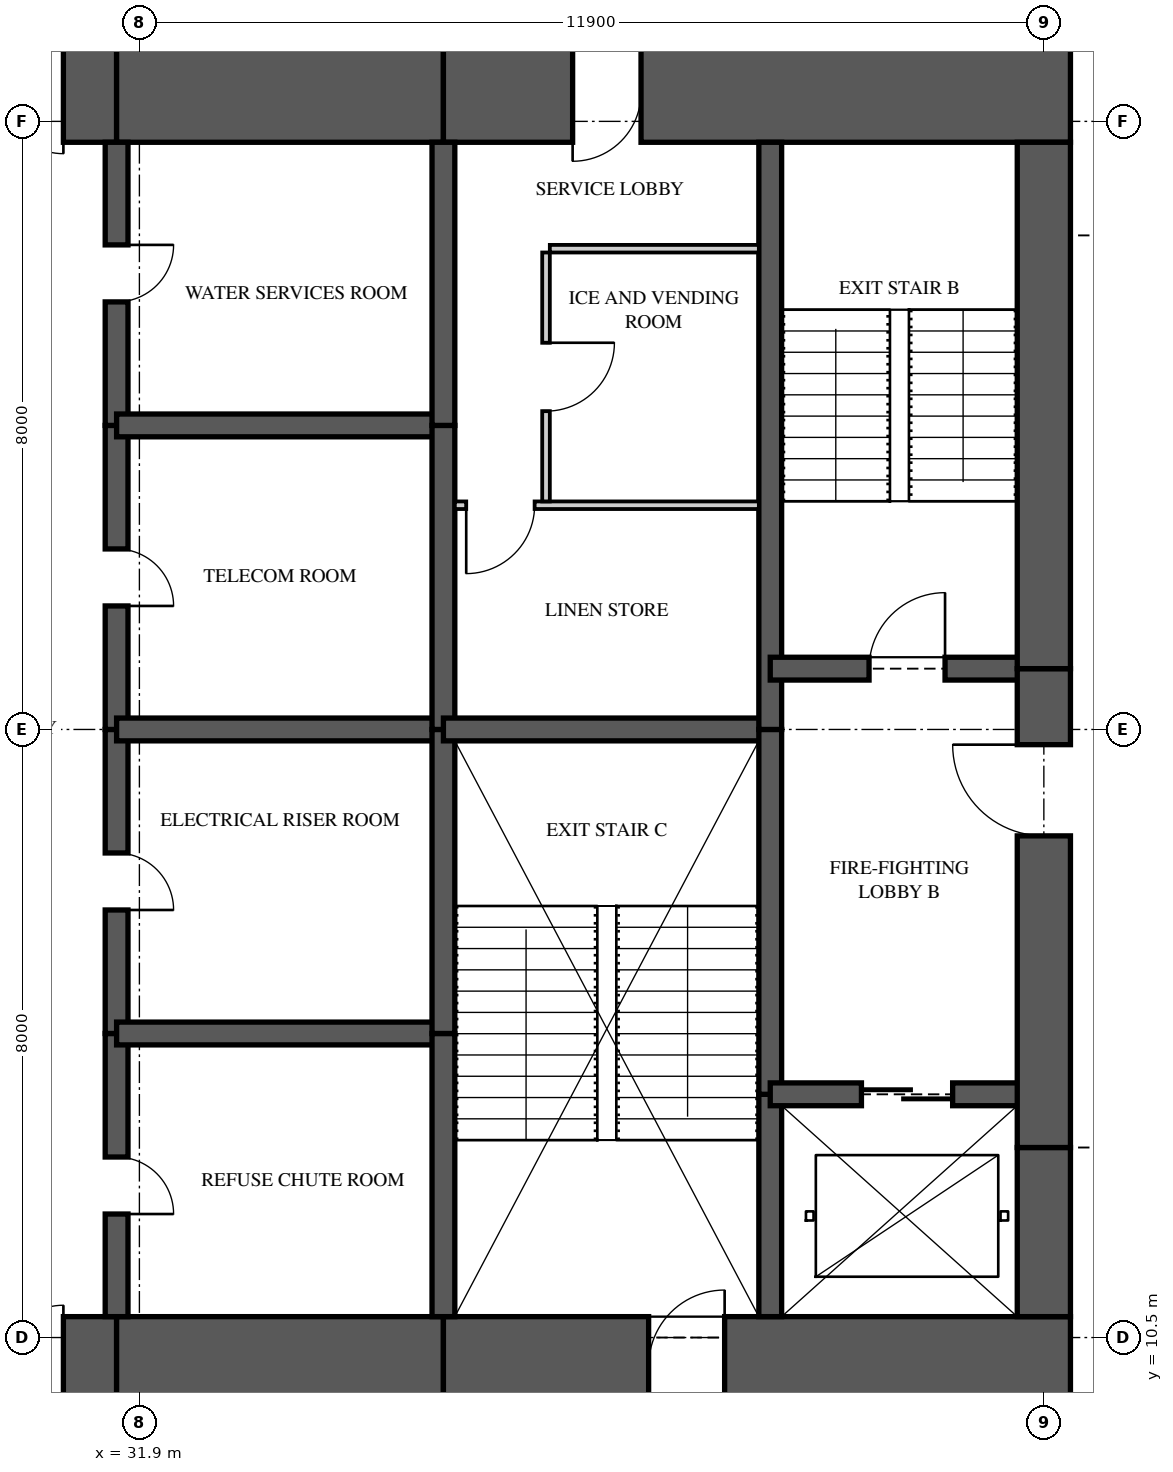
"""IFC4 building model, lengths in metres.
Left out: names, types, materials, properties, quantities, classifications, styles, units other than length and angle.
Written with IfcOpenShell. Run it as: python <this file> out.ifc"""

import sys

from ifc_helpers import new_model, si_unit, direction, frame, frame_2d, origin, place, context, subcontext, project, spatial, rectangle, extrude, element, fill, save


model = new_model("IFC4")
c1 = context("Model", 3, precision=1e-05, world=origin(), true_north=direction((0.0, 1.0)))
c2 = subcontext(c1, "Body", "Model", "MODEL_VIEW")
j1 = project(units=[si_unit("LENGTHUNIT", "METRE"), si_unit("PLANEANGLEUNIT", "RADIAN")], contexts=[c1])
p1 = place(None, origin())
s1 = spatial("IfcSite", under=j1, at=p1, CompositionType="ELEMENT")
p2 = place(p1, origin())
s2 = spatial("IfcBuilding", under=s1, at=p2, CompositionType="ELEMENT")
p3 = place(p2, frame((0.0, 0.0, 201.25)))
s3 = spatial("IfcBuildingStorey", under=s2, at=p3, CompositionType="ELEMENT", Elevation=201.25)
p4 = place(p3, frame((26.0, 10.125, 0.0), z_axis=(0.0, 0.0, 1.0), x_axis=(1.0, 0.0, 0.0)))
e1 = element("IfcWall", 1, at=p4, inside=s3, PredefinedType="SHEAR", context=c2, shape_type="SweptSolid", body=[
    extrude(rectangle(XDim=5.6, YDim=1.3, at=frame_2d((2.8, 0.0))), origin(), (0.0, 0.0, 1.0), 3.35),
])
p5 = place(p4, frame((3.3, 0.0, 0.0)))
e2 = element("IfcOpeningElement", 2, at=p5, cuts=e1, PredefinedType="OPENING", context=c2, shape_type="SweptSolid", body=[
    extrude(rectangle(XDim=1.6, YDim=2.1, at=frame_2d((0.8, 1.05))), frame((0.0, 0.66, 0.0), z_axis=(0.0, -1.0, 0.0), x_axis=(1.0, 0.0, 0.0)), (0.0, 0.0, 1.0), 1.32),
])
p6 = place(p3, frame((31.6, 10.125, 0.0), z_axis=(0.0, 0.0, 1.0), x_axis=(1.0, 0.0, 0.0)))
e3 = element("IfcWall", 3, at=p6, inside=s3, PredefinedType="SHEAR", context=c2, shape_type="SweptSolid", body=[
    extrude(rectangle(XDim=4.3, YDim=1.3, at=frame_2d((2.15, 0.0))), origin(), (0.0, 0.0, 1.0), 3.35),
])
p7 = place(p3, frame((35.9, 10.125, 0.0), z_axis=(0.0, 0.0, 1.0), x_axis=(1.0, 0.0, 0.0)))
e4 = element("IfcWall", 4, at=p7, inside=s3, PredefinedType="SHEAR", context=c2, shape_type="SweptSolid", body=[
    extrude(rectangle(XDim=8.25, YDim=1.3, at=frame_2d((4.125, 0.0))), origin(), (0.0, 0.0, 1.0), 3.35),
])
p8 = place(p7, frame((2.7, 0.0, 0.0)))
e5 = element("IfcOpeningElement", 5, at=p8, cuts=e4, PredefinedType="OPENING", context=c2, shape_type="SweptSolid", body=[
    extrude(rectangle(XDim=1.0, YDim=2.1, at=frame_2d((0.5, 1.05))), frame((0.0, 0.66, 0.0), z_axis=(0.0, -1.0, 0.0), x_axis=(1.0, 0.0, 0.0)), (0.0, 0.0, 1.0), 1.32),
])
p9 = place(p3, frame((44.15, 26.875, 0.0), z_axis=(0.0, 0.0, 1.0), x_axis=(-1.0, 0.0, 0.0)))
e6 = element("IfcWall", 6, at=p9, inside=s3, PredefinedType="SHEAR", context=c2, shape_type="SweptSolid", body=[
    extrude(rectangle(XDim=8.25, YDim=1.3, at=frame_2d((4.125, 0.0))), origin(), (0.0, 0.0, 1.0), 3.35),
])
p10 = place(p9, frame((5.65, 0.0, 0.0)))
e7 = element("IfcOpeningElement", 7, at=p10, cuts=e6, PredefinedType="OPENING", context=c2, shape_type="SweptSolid", body=[
    extrude(rectangle(XDim=0.9, YDim=2.1, at=frame_2d((0.45, 1.05))), frame((0.0, 0.66, 0.0), z_axis=(0.0, -1.0, 0.0), x_axis=(1.0, 0.0, 0.0)), (0.0, 0.0, 1.0), 1.32),
])
p11 = place(p3, frame((35.9, 26.875, 0.0), z_axis=(0.0, 0.0, 1.0), x_axis=(-1.0, 0.0, 0.0)))
e8 = element("IfcWall", 8, at=p11, inside=s3, PredefinedType="SHEAR", context=c2, shape_type="SweptSolid", body=[
    extrude(rectangle(XDim=4.3, YDim=1.3, at=frame_2d((2.15, 0.0))), origin(), (0.0, 0.0, 1.0), 3.35),
])
p12 = place(p3, frame((31.6, 26.875, 0.0), z_axis=(0.0, 0.0, 1.0), x_axis=(-1.0, 0.0, 0.0)))
e9 = element("IfcWall", 9, at=p12, inside=s3, PredefinedType="SHEAR", context=c2, shape_type="SweptSolid", body=[
    extrude(rectangle(XDim=5.6, YDim=1.3, at=frame_2d((2.8, 0.0))), origin(), (0.0, 0.0, 1.0), 3.35),
])
p13 = place(p12, frame((0.7, 0.0, 0.0)))
e10 = element("IfcOpeningElement", 10, at=p13, cuts=e9, PredefinedType="OPENING", context=c2, shape_type="SweptSolid", body=[
    extrude(rectangle(XDim=1.6, YDim=2.1, at=frame_2d((0.8, 1.05))), frame((0.0, 0.66, 0.0), z_axis=(0.0, -1.0, 0.0), x_axis=(1.0, 0.0, 0.0)), (0.0, 0.0, 1.0), 1.32),
])
p14 = place(p3, frame((43.8, 10.775, 0.0), z_axis=(0.0, 0.0, 1.0), x_axis=(0.0, 1.0, 0.0)))
e11 = element("IfcWall", 11, at=p14, inside=s3, PredefinedType="SHEAR", context=c2, shape_type="SweptSolid", body=[
    extrude(rectangle(XDim=2.225, YDim=0.7, at=frame_2d((1.113, 0.0))), origin(), (0.0, 0.0, 1.0), 3.35),
])
p15 = place(p3, frame((43.8, 13.0, 0.0), z_axis=(0.0, 0.0, 1.0), x_axis=(0.0, 1.0, 0.0)))
e12 = element("IfcWall", 12, at=p15, inside=s3, PredefinedType="SHEAR", context=c2, shape_type="SweptSolid", body=[
    extrude(rectangle(XDim=6.3, YDim=0.7, at=frame_2d((3.15, 0.0))), origin(), (0.0, 0.0, 1.0), 3.35),
])
p16 = place(p15, frame((4.1, 0.0, 0.0)))
e13 = element("IfcOpeningElement", 13, at=p16, cuts=e12, PredefinedType="OPENING", context=c2, shape_type="SweptSolid", body=[
    extrude(rectangle(XDim=1.2, YDim=2.2, at=frame_2d((0.6, 1.1))), frame((0.0, 0.36, 0.0), z_axis=(0.0, -1.0, 0.0), x_axis=(1.0, 0.0, 0.0)), (0.0, 0.0, 1.0), 0.72),
])
p17 = place(p3, frame((43.8, 19.3, 0.0), z_axis=(0.0, 0.0, 1.0), x_axis=(0.0, 1.0, 0.0)))
e14 = element("IfcWall", 14, at=p17, inside=s3, PredefinedType="SHEAR", context=c2, shape_type="SweptSolid", body=[
    extrude(rectangle(XDim=6.925, YDim=0.7, at=frame_2d((3.462, 0.0))), origin(), (0.0, 0.0, 1.0), 3.35),
])
p18 = place(p3, frame((31.6, 10.775, 0.0), z_axis=(0.0, 0.0, 1.0), x_axis=(0.0, 1.0, 0.0)))
e15 = element("IfcWall", 15, at=p18, inside=s3, PredefinedType="SHEAR", context=c2, shape_type="SweptSolid", body=[
    extrude(rectangle(XDim=3.725, YDim=0.3, at=frame_2d((1.863, 0.0))), origin(), (0.0, 0.0, 1.0), 3.35),
])
p19 = place(p18, frame((1.35, 0.0, 0.0)))
e16 = element("IfcOpeningElement", 16, at=p19, cuts=e15, PredefinedType="OPENING", context=c2, shape_type="SweptSolid", body=[
    extrude(rectangle(XDim=0.75, YDim=2.1, at=frame_2d((0.375, 1.05))), frame((0.0, 0.16, 0.0), z_axis=(0.0, -1.0, 0.0), x_axis=(1.0, 0.0, 0.0)), (0.0, 0.0, 1.0), 0.32),
])
p20 = place(p3, frame((31.6, 14.5, 0.0), z_axis=(0.0, 0.0, 1.0), x_axis=(0.0, 1.0, 0.0)))
e17 = element("IfcWall", 17, at=p20, inside=s3, PredefinedType="SHEAR", context=c2, shape_type="SweptSolid", body=[
    extrude(rectangle(XDim=4.0, YDim=0.3, at=frame_2d((2.0, 0.0))), origin(), (0.0, 0.0, 1.0), 3.35),
])
p21 = place(p20, frame((1.625, 0.0, 0.0)))
e18 = element("IfcOpeningElement", 18, at=p21, cuts=e17, PredefinedType="OPENING", context=c2, shape_type="SweptSolid", body=[
    extrude(rectangle(XDim=0.75, YDim=2.1, at=frame_2d((0.375, 1.05))), frame((0.0, 0.16, 0.0), z_axis=(0.0, -1.0, 0.0), x_axis=(1.0, 0.0, 0.0)), (0.0, 0.0, 1.0), 0.32),
])
p22 = place(p3, frame((31.6, 18.5, 0.0), z_axis=(0.0, 0.0, 1.0), x_axis=(0.0, 1.0, 0.0)))
e19 = element("IfcWall", 19, at=p22, inside=s3, PredefinedType="SHEAR", context=c2, shape_type="SweptSolid", body=[
    extrude(rectangle(XDim=4.0, YDim=0.3, at=frame_2d((2.0, 0.0))), origin(), (0.0, 0.0, 1.0), 3.35),
])
p23 = place(p22, frame((1.625, 0.0, 0.0)))
e20 = element("IfcOpeningElement", 20, at=p23, cuts=e19, PredefinedType="OPENING", context=c2, shape_type="SweptSolid", body=[
    extrude(rectangle(XDim=0.75, YDim=2.1, at=frame_2d((0.375, 1.05))), frame((0.0, 0.16, 0.0), z_axis=(0.0, -1.0, 0.0), x_axis=(1.0, 0.0, 0.0)), (0.0, 0.0, 1.0), 0.32),
])
p24 = place(p3, frame((31.6, 22.5, 0.0), z_axis=(0.0, 0.0, 1.0), x_axis=(0.0, 1.0, 0.0)))
e21 = element("IfcWall", 21, at=p24, inside=s3, PredefinedType="SHEAR", context=c2, shape_type="SweptSolid", body=[
    extrude(rectangle(XDim=3.725, YDim=0.3, at=frame_2d((1.863, 0.0))), origin(), (0.0, 0.0, 1.0), 3.35),
])
p25 = place(p24, frame((1.625, 0.0, 0.0)))
e22 = element("IfcOpeningElement", 22, at=p25, cuts=e21, PredefinedType="OPENING", context=c2, shape_type="SweptSolid", body=[
    extrude(rectangle(XDim=0.75, YDim=2.1, at=frame_2d((0.375, 1.05))), frame((0.0, 0.16, 0.0), z_axis=(0.0, -1.0, 0.0), x_axis=(1.0, 0.0, 0.0)), (0.0, 0.0, 1.0), 0.32),
])
p26 = place(p3, frame((35.9, 10.775, 0.0), z_axis=(0.0, 0.0, 1.0), x_axis=(0.0, 1.0, 0.0)))
e23 = element("IfcWall", 23, at=p26, inside=s3, PredefinedType="SHEAR", context=c2, shape_type="SweptSolid", body=[
    extrude(rectangle(XDim=3.725, YDim=0.3, at=frame_2d((1.863, 0.0))), origin(), (0.0, 0.0, 1.0), 3.35),
])
for number, where, z_axis, x_axis in (
    (24, (35.9, 14.5, 0.0), (0.0, 0.0, 1.0), (0.0, 1.0, 0.0)),
    (25, (35.9, 18.5, 0.0), (0.0, 0.0, 1.0), (0.0, 1.0, 0.0)),
):
    element("IfcWall", number, at=place(p3, frame(where, z_axis=z_axis, x_axis=x_axis)), inside=s3, PredefinedType="SHEAR", context=c2, shape_type="SweptSolid", body=[
        extrude(rectangle(XDim=4.0, YDim=0.3, at=frame_2d((2.0, 0.0))), origin(), (0.0, 0.0, 1.0), 3.35),
    ])
p27 = place(p3, frame((35.9, 22.5, 0.0), z_axis=(0.0, 0.0, 1.0), x_axis=(0.0, 1.0, 0.0)))
e26 = element("IfcWall", 26, at=p27, inside=s3, PredefinedType="SHEAR", context=c2, shape_type="SweptSolid", body=[
    extrude(rectangle(XDim=3.725, YDim=0.3, at=frame_2d((1.863, 0.0))), origin(), (0.0, 0.0, 1.0), 3.35),
])
p28 = place(p3, frame((40.2, 10.775, 0.0), z_axis=(0.0, 0.0, 1.0), x_axis=(0.0, 1.0, 0.0)))
e27 = element("IfcWall", 27, at=p28, inside=s3, PredefinedType="SHEAR", context=c2, shape_type="SweptSolid", body=[
    extrude(rectangle(XDim=2.925, YDim=0.3, at=frame_2d((1.462, 0.0))), origin(), (0.0, 0.0, 1.0), 3.35),
])
p29 = place(p3, frame((40.2, 13.7, 0.0), z_axis=(0.0, 0.0, 1.0), x_axis=(0.0, 1.0, 0.0)))
e28 = element("IfcWall", 28, at=p29, inside=s3, PredefinedType="SHEAR", context=c2, shape_type="SweptSolid", body=[
    extrude(rectangle(XDim=4.8, YDim=0.3, at=frame_2d((2.4, 0.0))), origin(), (0.0, 0.0, 1.0), 3.35),
])
p30 = place(p3, frame((40.2, 18.5, 0.0), z_axis=(0.0, 0.0, 1.0), x_axis=(0.0, 1.0, 0.0)))
e29 = element("IfcWall", 29, at=p30, inside=s3, PredefinedType="SHEAR", context=c2, shape_type="SweptSolid", body=[
    extrude(rectangle(XDim=7.725, YDim=0.3, at=frame_2d((3.863, 0.0))), origin(), (0.0, 0.0, 1.0), 3.35),
])
for number, where, z_axis, x_axis in (
    (30, (31.6, 14.5, 0.0), (0.0, 0.0, 1.0), (1.0, 0.0, 0.0)),
    (31, (31.6, 18.5, 0.0), (0.0, 0.0, 1.0), (1.0, 0.0, 0.0)),
    (32, (31.6, 22.5, 0.0), (0.0, 0.0, 1.0), (1.0, 0.0, 0.0)),
):
    element("IfcWall", number, at=place(p3, frame(where, z_axis=z_axis, x_axis=x_axis)), inside=s3, PredefinedType="SHEAR", context=c2, shape_type="SweptSolid", body=[
        extrude(rectangle(XDim=4.3, YDim=0.3, at=frame_2d((2.15, 0.0))), origin(), (0.0, 0.0, 1.0), 3.35),
    ])
p31 = place(p3, frame((35.9, 18.5, 0.0), z_axis=(0.0, 0.0, 1.0), x_axis=(1.0, 0.0, 0.0)))
e33 = element("IfcWall", 33, at=p31, inside=s3, PredefinedType="SHEAR", context=c2, shape_type="SweptSolid", body=[
    extrude(rectangle(XDim=4.3, YDim=0.3, at=frame_2d((2.15, 0.0))), origin(), (0.0, 0.0, 1.0), 3.35),
])
p32 = place(p3, frame((40.2, 13.7, 0.0), z_axis=(0.0, 0.0, 1.0), x_axis=(1.0, 0.0, 0.0)))
e34 = element("IfcWall", 34, at=p32, inside=s3, PredefinedType="SHEAR", context=c2, shape_type="SweptSolid", body=[
    extrude(rectangle(XDim=3.6, YDim=0.3, at=frame_2d((1.8, 0.0))), origin(), (0.0, 0.0, 1.0), 3.35),
])
p33 = place(p32, frame((1.2, 0.0, 0.0)))
e35 = element("IfcOpeningElement", 35, at=p33, cuts=e34, PredefinedType="OPENING", context=c2, shape_type="SweptSolid", body=[
    extrude(rectangle(XDim=1.2, YDim=2.1, at=frame_2d((0.6, 1.05))), frame((0.0, 0.16, 0.0), z_axis=(0.0, -1.0, 0.0), x_axis=(1.0, 0.0, 0.0)), (0.0, 0.0, 1.0), 0.32),
])
p34 = place(p3, frame((40.2, 19.3, 0.0), z_axis=(0.0, 0.0, 1.0), x_axis=(1.0, 0.0, 0.0)))
e36 = element("IfcWall", 36, at=p34, inside=s3, PredefinedType="SHEAR", context=c2, shape_type="SweptSolid", body=[
    extrude(rectangle(XDim=3.6, YDim=0.3, at=frame_2d((1.8, 0.0))), origin(), (0.0, 0.0, 1.0), 3.35),
])
p35 = place(p34, frame((1.3, 0.0, 0.0)))
e37 = element("IfcOpeningElement", 37, at=p35, cuts=e36, PredefinedType="OPENING", context=c2, shape_type="SweptSolid", body=[
    extrude(rectangle(XDim=1.0, YDim=2.1, at=frame_2d((0.5, 1.05))), frame((0.0, 0.16, 0.0), z_axis=(0.0, -1.0, 0.0), x_axis=(1.0, 0.0, 0.0)), (0.0, 0.0, 1.0), 0.32),
])
p36 = place(p3, frame((37.3, 24.825, 0.0), z_axis=(0.0, 0.0, 1.0), x_axis=(1.0, 0.0, 0.0)))
e38 = element("IfcWall", 38, at=p36, inside=s3, PredefinedType="PARTITIONING", context=c2, shape_type="SweptSolid", body=[
    extrude(rectangle(XDim=2.75, YDim=0.1, at=frame_2d((1.375, 0.0))), origin(), (0.0, 0.0, 1.0), 3.11),
])
p37 = place(p3, frame((37.25, 21.5, 0.0), z_axis=(0.0, 0.0, 1.0), x_axis=(0.0, 1.0, 0.0)))
e39 = element("IfcWall", 39, at=p37, inside=s3, PredefinedType="PARTITIONING", context=c2, shape_type="SweptSolid", body=[
    extrude(rectangle(XDim=3.275, YDim=0.1, at=frame_2d((1.637, 0.0))), origin(), (0.0, 0.0, 1.0), 3.11),
])
p38 = place(p37, frame((1.188, 0.0, 0.0)))
e40 = element("IfcOpeningElement", 40, at=p38, cuts=e39, PredefinedType="OPENING", context=c2, shape_type="SweptSolid", body=[
    extrude(rectangle(XDim=0.9, YDim=2.1, at=frame_2d((0.45, 1.05))), frame((0.0, 0.06, 0.0), z_axis=(0.0, -1.0, 0.0), x_axis=(1.0, 0.0, 0.0)), (0.0, 0.0, 1.0), 0.12),
])
p39 = place(p3, frame((36.05, 21.45, 0.0), z_axis=(0.0, 0.0, 1.0), x_axis=(1.0, 0.0, 0.0)))
e41 = element("IfcWall", 41, at=p39, inside=s3, PredefinedType="PARTITIONING", context=c2, shape_type="SweptSolid", body=[
    extrude(rectangle(XDim=4.0, YDim=0.1, at=frame_2d((2.0, 0.0))), origin(), (0.0, 0.0, 1.0), 3.11),
])
p40 = place(p39, frame((0.15, 0.0, 0.0)))
e42 = element("IfcOpeningElement", 42, at=p40, cuts=e41, PredefinedType="OPENING", context=c2, shape_type="SweptSolid", body=[
    extrude(rectangle(XDim=0.9, YDim=2.1, at=frame_2d((0.45, 1.05))), frame((0.0, 0.06, 0.0), z_axis=(0.0, -1.0, 0.0), x_axis=(1.0, 0.0, 0.0)), (0.0, 0.0, 1.0), 0.12),
])
p41 = place(p38, frame((0.9, 0.0, 0.0), z_axis=(0.0, 0.0, 1.0), x_axis=(-1.0, 0.0, 0.0)))
e43 = element("IfcDoor", 43, at=p41, inside=s3, OperationType="SINGLE_SWING_LEFT", PredefinedType="DOOR", context=c2, shape_type="SweptSolid", body=[
    extrude(rectangle(XDim=0.9, YDim=2.1, at=frame_2d((0.45, 1.05))), frame((0.0, 0.025, 0.0), z_axis=(0.0, -1.0, 0.0), x_axis=(1.0, 0.0, 0.0)), (0.0, 0.0, 1.0), 0.05),
])
fill(e40, e43)
p42 = place(p40, frame((0.9, 0.0, 0.0), z_axis=(0.0, 0.0, 1.0), x_axis=(-1.0, 0.0, 0.0)))
e44 = element("IfcDoor", 44, at=p42, inside=s3, OperationType="SINGLE_SWING_RIGHT", PredefinedType="DOOR", context=c2, shape_type="SweptSolid", body=[
    extrude(rectangle(XDim=0.9, YDim=2.1, at=frame_2d((0.45, 1.05))), frame((0.0, 0.025, 0.0), z_axis=(0.0, -1.0, 0.0), x_axis=(1.0, 0.0, 0.0)), (0.0, 0.0, 1.0), 0.05),
])
fill(e42, e44)
p43 = place(p35, origin())
e45 = element("IfcDoor", 45, at=p43, inside=s3, OperationType="SINGLE_SWING_RIGHT", PredefinedType="DOOR", context=c2, shape_type="SweptSolid", body=[
    extrude(rectangle(XDim=1.0, YDim=2.1, at=frame_2d((0.5, 1.05))), frame((0.0, 0.025, 0.0), z_axis=(0.0, -1.0, 0.0), x_axis=(1.0, 0.0, 0.0)), (0.0, 0.0, 1.0), 0.05),
])
fill(e37, e45)
p44 = place(p16, origin())
e46 = element("IfcDoor", 46, at=p44, inside=s3, OperationType="SINGLE_SWING_RIGHT", PredefinedType="DOOR", context=c2, shape_type="SweptSolid", body=[
    extrude(rectangle(XDim=1.2, YDim=2.2, at=frame_2d((0.6, 1.1))), frame((0.0, 0.025, 0.0), z_axis=(0.0, -1.0, 0.0), x_axis=(1.0, 0.0, 0.0)), (0.0, 0.0, 1.0), 0.05),
])
fill(e13, e46)
p45 = place(p33, origin())
e47 = element("IfcDoor", 47, at=p45, inside=s3, OperationType="SLIDING_TO_LEFT", PredefinedType="DOOR", context=c2, shape_type="SweptSolid", body=[
    extrude(rectangle(XDim=1.2, YDim=2.1, at=frame_2d((0.6, 1.05))), frame((0.0, 0.025, 0.0), z_axis=(0.0, -1.0, 0.0), x_axis=(1.0, 0.0, 0.0)), (0.0, 0.0, 1.0), 0.05),
])
fill(e35, e47)
p46 = place(p5, origin())
e48 = element("IfcDoor", 48, at=p46, inside=s3, OperationType="DOUBLE_DOOR_SINGLE_SWING", PredefinedType="DOOR", context=c2, shape_type="SweptSolid", body=[
    extrude(rectangle(XDim=1.6, YDim=2.1, at=frame_2d((0.8, 1.05))), frame((0.0, 0.025, 0.0), z_axis=(0.0, -1.0, 0.0), x_axis=(1.0, 0.0, 0.0)), (0.0, 0.0, 1.0), 0.05),
])
fill(e2, e48)
p47 = place(p13, origin())
e49 = element("IfcDoor", 49, at=p47, inside=s3, OperationType="DOUBLE_DOOR_SINGLE_SWING", PredefinedType="DOOR", context=c2, shape_type="SweptSolid", body=[
    extrude(rectangle(XDim=1.6, YDim=2.1, at=frame_2d((0.8, 1.05))), frame((0.0, 0.025, 0.0), z_axis=(0.0, -1.0, 0.0), x_axis=(1.0, 0.0, 0.0)), (0.0, 0.0, 1.0), 0.05),
])
fill(e10, e49)
p48 = place(p19, frame((0.75, 0.0, 0.0), z_axis=(0.0, 0.0, 1.0), x_axis=(-1.0, 0.0, 0.0)))
e50 = element("IfcDoor", 50, at=p48, inside=s3, OperationType="SINGLE_SWING_RIGHT", PredefinedType="DOOR", context=c2, shape_type="SweptSolid", body=[
    extrude(rectangle(XDim=0.75, YDim=2.1, at=frame_2d((0.375, 1.05))), frame((0.0, 0.025, 0.0), z_axis=(0.0, -1.0, 0.0), x_axis=(1.0, 0.0, 0.0)), (0.0, 0.0, 1.0), 0.05),
])
fill(e16, e50)
p49 = place(p21, frame((0.75, 0.0, 0.0), z_axis=(0.0, 0.0, 1.0), x_axis=(-1.0, 0.0, 0.0)))
e51 = element("IfcDoor", 51, at=p49, inside=s3, OperationType="SINGLE_SWING_RIGHT", PredefinedType="DOOR", context=c2, shape_type="SweptSolid", body=[
    extrude(rectangle(XDim=0.75, YDim=2.1, at=frame_2d((0.375, 1.05))), frame((0.0, 0.025, 0.0), z_axis=(0.0, -1.0, 0.0), x_axis=(1.0, 0.0, 0.0)), (0.0, 0.0, 1.0), 0.05),
])
fill(e18, e51)
p50 = place(p23, frame((0.75, 0.0, 0.0), z_axis=(0.0, 0.0, 1.0), x_axis=(-1.0, 0.0, 0.0)))
e52 = element("IfcDoor", 52, at=p50, inside=s3, OperationType="SINGLE_SWING_RIGHT", PredefinedType="DOOR", context=c2, shape_type="SweptSolid", body=[
    extrude(rectangle(XDim=0.75, YDim=2.1, at=frame_2d((0.375, 1.05))), frame((0.0, 0.025, 0.0), z_axis=(0.0, -1.0, 0.0), x_axis=(1.0, 0.0, 0.0)), (0.0, 0.0, 1.0), 0.05),
])
fill(e20, e52)
p51 = place(p25, frame((0.75, 0.0, 0.0), z_axis=(0.0, 0.0, 1.0), x_axis=(-1.0, 0.0, 0.0)))
e53 = element("IfcDoor", 53, at=p51, inside=s3, OperationType="SINGLE_SWING_LEFT", PredefinedType="DOOR", context=c2, shape_type="SweptSolid", body=[
    extrude(rectangle(XDim=0.75, YDim=2.1, at=frame_2d((0.375, 1.05))), frame((0.0, 0.025, 0.0), z_axis=(0.0, -1.0, 0.0), x_axis=(1.0, 0.0, 0.0)), (0.0, 0.0, 1.0), 0.05),
])
fill(e22, e53)
p52 = place(p8, origin())
e54 = element("IfcDoor", 54, at=p52, inside=s3, OperationType="SINGLE_SWING_RIGHT", PredefinedType="DOOR", context=c2, shape_type="SweptSolid", body=[
    extrude(rectangle(XDim=1.0, YDim=2.1, at=frame_2d((0.5, 1.05))), frame((0.0, 0.025, 0.0), z_axis=(0.0, -1.0, 0.0), x_axis=(1.0, 0.0, 0.0)), (0.0, 0.0, 1.0), 0.05),
])
fill(e5, e54)
p53 = place(p10, origin())
e55 = element("IfcDoor", 55, at=p53, inside=s3, OperationType="SINGLE_SWING_RIGHT", PredefinedType="DOOR", context=c2, shape_type="SweptSolid", body=[
    extrude(rectangle(XDim=0.9, YDim=2.1, at=frame_2d((0.45, 1.05))), frame((0.0, 0.47, 0.0), z_axis=(0.0, -1.0, 0.0), x_axis=(1.0, 0.0, 0.0)), (0.0, 0.0, 1.0), 0.8),
])
fill(e7, e55)
save(model, sys.argv[1])
